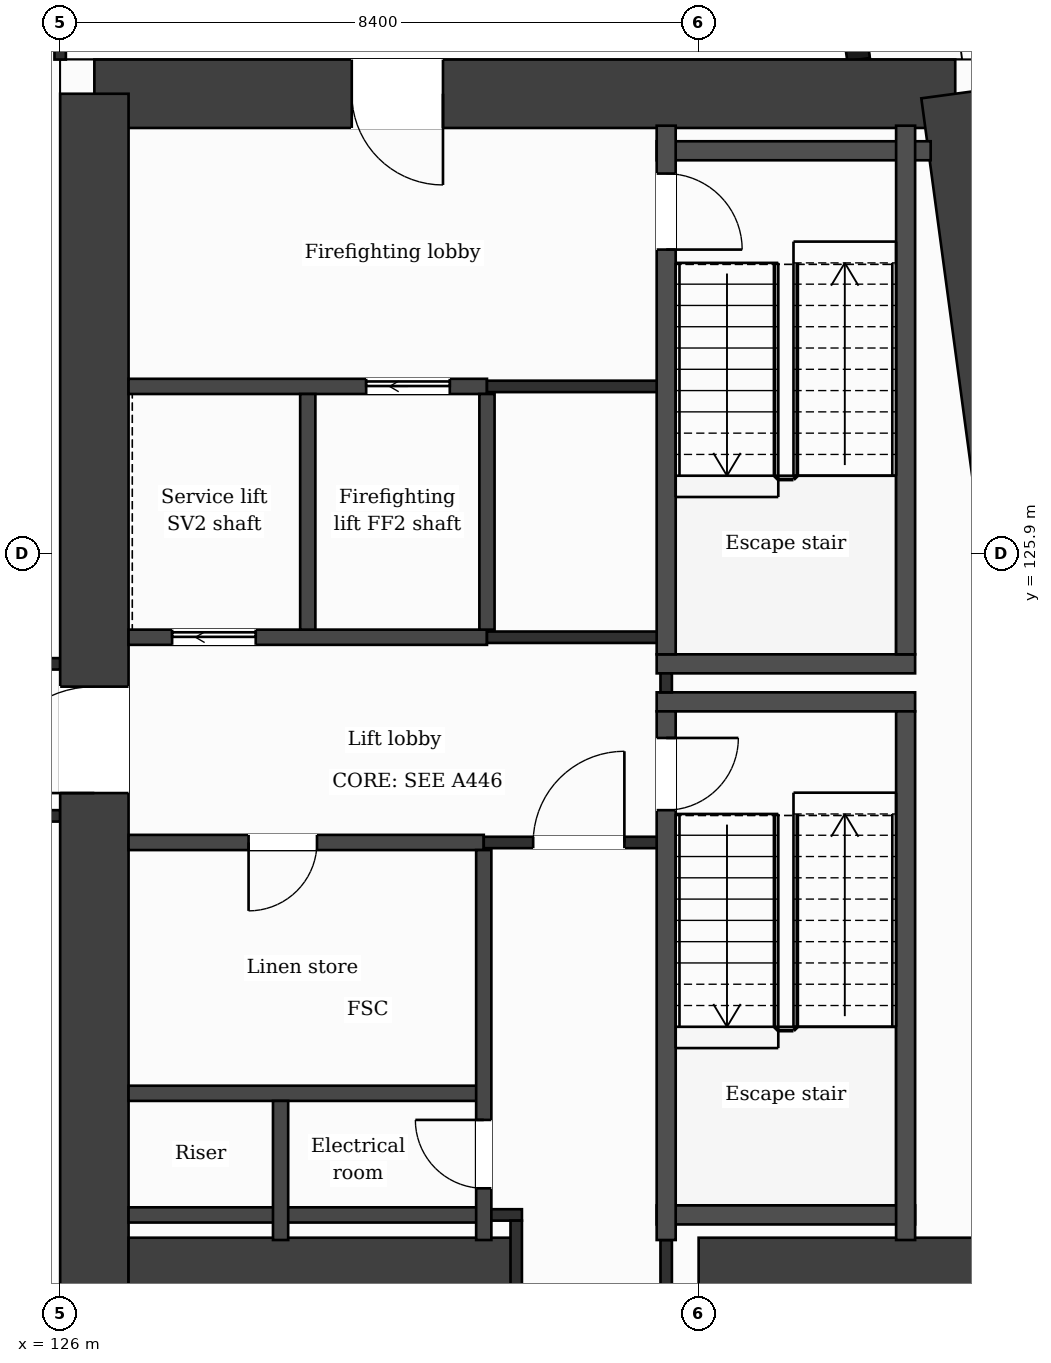
"""IFC4 building model, lengths in metres.
Left out: names, types, materials, properties, quantities, classifications, styles, units other than length and angle.
Written with IfcOpenShell. Run it as: python <this file> out.ifc"""

import sys

from ifc_helpers import new_model, si_unit, direction, frame, frame_2d, origin, place, context, subcontext, project, spatial, rectangle, extrude, element, fill, save


model = new_model("IFC4")
c1 = context("Model", 3, precision=1e-05, world=origin(), true_north=direction((0.0, 1.0)))
c2 = subcontext(c1, "Body", "Model", "MODEL_VIEW")
j1 = project(units=[si_unit("LENGTHUNIT", "METRE"), si_unit("PLANEANGLEUNIT", "RADIAN")], contexts=[c1])
p1 = place(None, origin())
s1 = spatial("IfcSite", under=j1, at=p1, CompositionType="ELEMENT")
p2 = place(p1, origin())
s2 = spatial("IfcBuilding", under=s1, at=p2, CompositionType="ELEMENT")
p3 = place(p2, frame((0.0, 0.0, 188.5)))
s3 = spatial("IfcBuildingStorey", under=s2, at=p3, CompositionType="ELEMENT", Elevation=188.5)
p4 = place(p3, frame((126.45, 131.95, 0.0), z_axis=(0.0, 0.0, 1.0), x_axis=(1.0, 0.0, 0.0)))
e1 = element("IfcWall", 1, at=p4, inside=s3, PredefinedType="SHEAR", context=c2, shape_type="SweptSolid", body=[
    extrude(rectangle(XDim=11.326, YDim=0.9, at=frame_2d((5.663, 0.0))), origin(), (0.0, 0.0, 1.0), 3.7),
])
p5 = place(p4, frame((3.386, 0.0, 0.0)))
e2 = element("IfcOpeningElement", 2, at=p5, cuts=e1, PredefinedType="OPENING", context=c2, shape_type="SweptSolid", body=[
    extrude(rectangle(XDim=1.2, YDim=2.1, at=frame_2d((0.6, 1.05))), frame((0.0, 0.46, 0.0), z_axis=(0.0, -1.0, 0.0), x_axis=(1.0, 0.0, 0.0)), (0.0, 0.0, 1.0), 0.92),
])
p6 = place(p3, frame((137.776, 131.95, 0.0), z_axis=(0.0, 0.0, 1.0), x_axis=(0.133421759112, -0.991059349482, 0.0)))
e3 = element("IfcWall", 3, at=p6, inside=s3, PredefinedType="SHEAR", context=c2, shape_type="SweptSolid", body=[
    extrude(rectangle(XDim=21.29, YDim=0.9, at=frame_2d((10.645, 0.0))), origin(), (0.0, 0.0, 1.0), 3.7),
])
p7 = place(p3, frame((126.45, 110.85, 0.0), z_axis=(0.0, 0.0, 1.0), x_axis=(0.0, 1.0, 0.0)))
e4 = element("IfcWall", 4, at=p7, inside=s3, PredefinedType="SHEAR", context=c2, shape_type="SweptSolid", body=[
    extrude(rectangle(XDim=21.1, YDim=0.9, at=frame_2d((10.55, 0.0))), origin(), (0.0, 0.0, 1.0), 3.7),
])
p8 = place(p7, frame((11.9, 0.0, 0.0)))
e5 = element("IfcOpeningElement", 5, at=p8, cuts=e4, PredefinedType="OPENING", context=c2, shape_type="SweptSolid", body=[
    extrude(rectangle(XDim=1.4, YDim=2.1, at=frame_2d((0.7, 1.05))), frame((0.0, 0.46, 0.0), z_axis=(0.0, -1.0, 0.0), x_axis=(1.0, 0.0, 0.0)), (0.0, 0.0, 1.0), 0.92),
])
p9 = place(p3, frame((126.9, 116.45, 0.0), z_axis=(0.0, 0.0, 1.0), x_axis=(1.0, 0.0, 0.0)))
e6 = element("IfcWall", 6, at=p9, inside=s3, PredefinedType="SHEAR", context=c2, shape_type="SweptSolid", body=[
    extrude(rectangle(XDim=5.1, YDim=0.9, at=frame_2d((2.55, 0.0))), origin(), (0.0, 0.0, 1.0), 3.7),
])
p10 = place(p3, frame((134.4, 116.45, 0.0), z_axis=(0.0, 0.0, 1.0), x_axis=(1.0, 0.0, 0.0)))
e7 = element("IfcWall", 7, at=p10, inside=s3, PredefinedType="SHEAR", context=c2, shape_type="SweptSolid", body=[
    extrude(rectangle(XDim=5.077, YDim=0.9, at=frame_2d((2.539, 0.0))), origin(), (0.0, 0.0, 1.0), 3.7),
])
p11 = place(p3, frame((136.504, 132.4, 0.0), z_axis=(0.0, 0.0, 1.0), x_axis=(-0.133399697462, 0.99106231929, 0.0)))
e8 = element("IfcWall", 8, at=p11, inside=s3, PredefinedType="SOLIDWALL", context=c2, shape_type="SweptSolid", body=[
    extrude(rectangle(XDim=6.74, YDim=0.3, at=frame_2d((3.37, 0.0))), origin(), (0.0, 0.0, 1.0), 3.25),
])
p12 = place(p11, frame((1.115, 0.0, 0.0)))
e9 = element("IfcOpeningElement", 9, at=p12, cuts=e8, PredefinedType="OPENING", context=c2, shape_type="SweptSolid", body=[
    extrude(rectangle(XDim=1.2, YDim=2.4, at=frame_2d((0.6, 1.2))), frame((0.0, 0.16, 0.0), z_axis=(0.0, -1.0, 0.0), x_axis=(1.0, 0.0, 0.0)), (0.0, 0.0, 1.0), 0.32),
])
p13 = place(p11, frame((4.436, 0.0, 0.9)))
e10 = element("IfcOpeningElement", 10, at=p13, cuts=e8, PredefinedType="OPENING", context=c2, shape_type="SweptSolid", body=[
    extrude(rectangle(XDim=1.2, YDim=2.1, at=frame_2d((0.6, 1.05))), frame((0.0, 0.16, 0.0), z_axis=(0.0, -1.0, 0.0), x_axis=(1.0, 0.0, 0.0)), (0.0, 0.0, 1.0), 0.32),
])
p14 = place(p3, frame((126.9, 117.2, 0.0), z_axis=(0.0, 0.0, 1.0), x_axis=(1.0, 0.0, 0.0)))
e11 = element("IfcWall", 11, at=p14, inside=s3, PredefinedType="PARTITIONING", context=c2, shape_type="SweptSolid", body=[
    extrude(rectangle(XDim=4.673, YDim=0.2, at=frame_2d((2.336, 0.0))), origin(), (0.0, 0.0, 1.0), 3.25),
])
p15 = place(p3, frame((131.573, 117.2, 0.0), z_axis=(0.0, 0.0, 1.0), x_axis=(1.0, 0.0, 0.0)))
e12 = element("IfcWall", 12, at=p15, inside=s3, PredefinedType="PARTITIONING", context=c2, shape_type="SweptSolid", body=[
    extrude(rectangle(XDim=0.502, YDim=0.15, at=frame_2d((0.251, 0.0))), origin(), (0.0, 0.0, 1.0), 3.25),
])
p16 = place(p3, frame((133.848, 117.2, 0.0), z_axis=(0.0, 0.0, 1.0), x_axis=(1.0, 0.0, 0.0)))
e13 = element("IfcWall", 13, at=p16, inside=s3, PredefinedType="PARTITIONING", context=c2, shape_type="SweptSolid", body=[
    extrude(rectangle(XDim=3.4, YDim=0.25, at=frame_2d((1.7, 0.0))), origin(), (0.0, 0.0, 1.0), 3.25),
])
p17 = place(p3, frame((126.9, 118.8, 0.0), z_axis=(0.0, 0.0, 1.0), x_axis=(1.0, 0.0, 0.0)))
e14 = element("IfcWall", 14, at=p17, inside=s3, PredefinedType="PARTITIONING", context=c2, shape_type="SweptSolid", body=[
    extrude(rectangle(XDim=4.673, YDim=0.2, at=frame_2d((2.336, 0.0))), origin(), (0.0, 0.0, 1.0), 3.25),
])
p18 = place(p3, frame((126.9, 122.1, 0.0), z_axis=(0.0, 0.0, 1.0), x_axis=(1.0, 0.0, 0.0)))
e15 = element("IfcWall", 15, at=p18, inside=s3, PredefinedType="PARTITIONING", context=c2, shape_type="SweptSolid", body=[
    extrude(rectangle(XDim=4.673, YDim=0.2, at=frame_2d((2.336, 0.0))), origin(), (0.0, 0.0, 1.0), 3.25),
])
p19 = place(p18, frame((1.579, 0.0, 0.0)))
e16 = element("IfcOpeningElement", 16, at=p19, cuts=e15, PredefinedType="OPENING", context=c2, shape_type="SweptSolid", body=[
    extrude(rectangle(XDim=0.9, YDim=2.1, at=frame_2d((0.45, 1.05))), frame((0.0, 0.11, 0.0), z_axis=(0.0, -1.0, 0.0), x_axis=(1.0, 0.0, 0.0)), (0.0, 0.0, 1.0), 0.22),
])
p20 = place(p3, frame((131.573, 122.1, 0.0), z_axis=(0.0, 0.0, 1.0), x_axis=(1.0, 0.0, 0.0)))
e17 = element("IfcWall", 17, at=p20, inside=s3, PredefinedType="PARTITIONING", context=c2, shape_type="SweptSolid", body=[
    extrude(rectangle(XDim=2.4, YDim=0.15, at=frame_2d((1.2, 0.0))), origin(), (0.0, 0.0, 1.0), 3.25),
])
p21 = place(p20, frame((0.65, 0.0, 0.0)))
e18 = element("IfcOpeningElement", 18, at=p21, cuts=e17, PredefinedType="OPENING", context=c2, shape_type="SweptSolid", body=[
    extrude(rectangle(XDim=1.2, YDim=2.1, at=frame_2d((0.6, 1.05))), frame((0.0, 0.085, 0.0), z_axis=(0.0, -1.0, 0.0), x_axis=(1.0, 0.0, 0.0)), (0.0, 0.0, 1.0), 0.17),
])
p22 = place(p3, frame((100.8, 122.45, 0.0), z_axis=(0.0, 0.0, 1.0), x_axis=(1.0, 0.0, 0.0)))
e19 = element("IfcWall", 19, at=p22, inside=s3, PredefinedType="PARTITIONING", context=c2, shape_type="SweptSolid", body=[
    extrude(rectangle(XDim=25.2, YDim=0.15, at=frame_2d((12.6, 0.0))), origin(), (0.0, 0.0, 1.0), 3.25),
])
for number, where, z_axis, x_axis in (
    (20, (133.848, 123.95, 0.0), (0.0, 0.0, 1.0), (1.0, 0.0, 0.0)),
    (21, (133.848, 124.45, 0.0), (0.0, 0.0, 1.0), (1.0, 0.0, 0.0)),
):
    element("IfcWall", number, at=place(p3, frame(where, z_axis=z_axis, x_axis=x_axis)), inside=s3, PredefinedType="PARTITIONING", context=c2, shape_type="SweptSolid", body=[
        extrude(rectangle(XDim=3.4, YDim=0.25, at=frame_2d((1.7, 0.0))), origin(), (0.0, 0.0, 1.0), 3.25),
    ])
p23 = place(p3, frame((100.8, 124.45, 0.0), z_axis=(0.0, 0.0, 1.0), x_axis=(1.0, 0.0, 0.0)))
e22 = element("IfcWall", 22, at=p23, inside=s3, PredefinedType="PARTITIONING", context=c2, shape_type="SweptSolid", body=[
    extrude(rectangle(XDim=25.2, YDim=0.15, at=frame_2d((12.6, 0.0))), origin(), (0.0, 0.0, 1.0), 3.25),
])
p24 = place(p23, frame((0.675, 0.0, 0.0)))
e23 = element("IfcOpeningElement", 23, at=p24, cuts=e22, PredefinedType="OPENING", context=c2, shape_type="SweptSolid", body=[
    extrude(rectangle(XDim=1.0, YDim=2.1, at=frame_2d((0.5, 1.05))), frame((0.0, 0.085, 0.0), z_axis=(0.0, -1.0, 0.0), x_axis=(1.0, 0.0, 0.0)), (0.0, 0.0, 1.0), 0.17),
])
p25 = place(p23, frame((5.175, 0.0, 0.0)))
e24 = element("IfcOpeningElement", 24, at=p25, cuts=e22, PredefinedType="OPENING", context=c2, shape_type="SweptSolid", body=[
    extrude(rectangle(XDim=1.0, YDim=2.1, at=frame_2d((0.5, 1.05))), frame((0.0, 0.085, 0.0), z_axis=(0.0, -1.0, 0.0), x_axis=(1.0, 0.0, 0.0)), (0.0, 0.0, 1.0), 0.17),
])
p26 = place(p23, frame((10.425, 0.0, 0.0)))
e25 = element("IfcOpeningElement", 25, at=p26, cuts=e22, PredefinedType="OPENING", context=c2, shape_type="SweptSolid", body=[
    extrude(rectangle(XDim=1.0, YDim=2.1, at=frame_2d((0.5, 1.05))), frame((0.0, 0.085, 0.0), z_axis=(0.0, -1.0, 0.0), x_axis=(1.0, 0.0, 0.0)), (0.0, 0.0, 1.0), 0.17),
])
p27 = place(p23, frame((22.175, 0.0, 0.0)))
e26 = element("IfcOpeningElement", 26, at=p27, cuts=e22, PredefinedType="OPENING", context=c2, shape_type="SweptSolid", body=[
    extrude(rectangle(XDim=1.0, YDim=2.1, at=frame_2d((0.5, 1.05))), frame((0.0, 0.085, 0.0), z_axis=(0.0, -1.0, 0.0), x_axis=(1.0, 0.0, 0.0)), (0.0, 0.0, 1.0), 0.17),
])
p28 = place(p3, frame((126.9, 124.8, 0.0), z_axis=(0.0, 0.0, 1.0), x_axis=(1.0, 0.0, 0.0)))
e27 = element("IfcWall", 27, at=p28, inside=s3, PredefinedType="PARTITIONING", context=c2, shape_type="SweptSolid", body=[
    extrude(rectangle(XDim=4.715, YDim=0.2, at=frame_2d((2.358, 0.0))), origin(), (0.0, 0.0, 1.0), 3.25),
])
p29 = place(p28, frame((0.573, 0.0, 0.0)))
e28 = element("IfcOpeningElement", 28, at=p29, cuts=e27, PredefinedType="OPENING", context=c2, shape_type="SweptSolid", body=[
    extrude(rectangle(XDim=1.1, YDim=2.1, at=frame_2d((0.55, 1.05))), frame((0.0, 0.11, 0.0), z_axis=(0.0, -1.0, 0.0), x_axis=(1.0, 0.0, 0.0)), (0.0, 0.0, 1.0), 0.22),
])
p30 = place(p3, frame((131.615, 124.8, 0.0), z_axis=(0.0, 0.0, 1.0), x_axis=(1.0, 0.0, 0.0)))
e29 = element("IfcWall", 29, at=p30, inside=s3, PredefinedType="PARTITIONING", context=c2, shape_type="SweptSolid", body=[
    extrude(rectangle(XDim=2.483, YDim=0.15, at=frame_2d((1.241, 0.0))), origin(), (0.0, 0.0, 1.0), 3.25),
])
p31 = place(p3, frame((126.9, 128.1, 0.0), z_axis=(0.0, 0.0, 1.0), x_axis=(1.0, 0.0, 0.0)))
e30 = element("IfcWall", 30, at=p31, inside=s3, PredefinedType="PARTITIONING", context=c2, shape_type="SweptSolid", body=[
    extrude(rectangle(XDim=4.715, YDim=0.2, at=frame_2d((2.358, 0.0))), origin(), (0.0, 0.0, 1.0), 3.25),
])
p32 = place(p31, frame((3.126, 0.0, 0.0)))
e31 = element("IfcOpeningElement", 31, at=p32, cuts=e30, PredefinedType="OPENING", context=c2, shape_type="SweptSolid", body=[
    extrude(rectangle(XDim=1.1, YDim=2.1, at=frame_2d((0.55, 1.05))), frame((0.0, 0.11, 0.0), z_axis=(0.0, -1.0, 0.0), x_axis=(1.0, 0.0, 0.0)), (0.0, 0.0, 1.0), 0.22),
])
p33 = place(p3, frame((131.615, 128.1, 0.0), z_axis=(0.0, 0.0, 1.0), x_axis=(1.0, 0.0, 0.0)))
e32 = element("IfcWall", 32, at=p33, inside=s3, PredefinedType="PARTITIONING", context=c2, shape_type="SweptSolid", body=[
    extrude(rectangle(XDim=2.358, YDim=0.15, at=frame_2d((1.179, 0.0))), origin(), (0.0, 0.0, 1.0), 3.25),
])
p34 = place(p3, frame((133.848, 131.2, 0.0), z_axis=(0.0, 0.0, 1.0), x_axis=(1.0, 0.0, 0.0)))
e33 = element("IfcWall", 33, at=p34, inside=s3, PredefinedType="PARTITIONING", context=c2, shape_type="SweptSolid", body=[
    extrude(rectangle(XDim=3.605, YDim=0.25, at=frame_2d((1.802, 0.0))), origin(), (0.0, 0.0, 1.0), 3.25),
])
p35 = place(p3, frame((126.0, 132.4, 0.0), z_axis=(0.0, 0.0, 1.0), x_axis=(0.0, 1.0, 0.0)))
e34 = element("IfcWall", 34, at=p35, inside=s3, PredefinedType="PARTITIONING", context=c2, shape_type="SweptSolid", body=[
    extrude(rectangle(XDim=1.325, YDim=0.15, at=frame_2d((0.663, 0.0))), origin(), (0.0, 0.0, 1.0), 3.25),
])
p36 = place(p3, frame((128.9, 116.87, 0.0), z_axis=(0.0, 0.0, 1.0), x_axis=(0.0, 1.0, 0.0)))
e35 = element("IfcWall", 35, at=p36, inside=s3, PredefinedType="PARTITIONING", context=c2, shape_type="SweptSolid", body=[
    extrude(rectangle(XDim=1.83, YDim=0.2, at=frame_2d((0.915, 0.0))), origin(), (0.0, 0.0, 1.0), 3.25),
])
p37 = place(p3, frame((129.258, 124.9, 0.0), z_axis=(0.0, 0.0, 1.0), x_axis=(0.0, 1.0, 0.0)))
e36 = element("IfcWall", 36, at=p37, inside=s3, PredefinedType="PARTITIONING", context=c2, shape_type="SweptSolid", body=[
    extrude(rectangle(XDim=3.1, YDim=0.2, at=frame_2d((1.55, 0.0))), origin(), (0.0, 0.0, 1.0), 3.25),
])
p38 = place(p3, frame((131.573, 116.87, 0.0), z_axis=(0.0, 0.0, 1.0), x_axis=(0.0, 1.0, 0.0)))
e37 = element("IfcWall", 37, at=p38, inside=s3, PredefinedType="PARTITIONING", context=c2, shape_type="SweptSolid", body=[
    extrude(rectangle(XDim=5.13, YDim=0.2, at=frame_2d((2.565, 0.0))), origin(), (0.0, 0.0, 1.0), 3.25),
])
p39 = place(p38, frame((0.68, 0.0, 0.0)))
e38 = element("IfcOpeningElement", 38, at=p39, cuts=e37, PredefinedType="OPENING", context=c2, shape_type="SweptSolid", body=[
    extrude(rectangle(XDim=0.9, YDim=2.1, at=frame_2d((0.45, 1.05))), frame((0.0, 0.11, 0.0), z_axis=(0.0, -1.0, 0.0), x_axis=(1.0, 0.0, 0.0)), (0.0, 0.0, 1.0), 0.22),
])
p40 = place(p3, frame((131.615, 124.9, 0.0), z_axis=(0.0, 0.0, 1.0), x_axis=(0.0, 1.0, 0.0)))
e39 = element("IfcWall", 39, at=p40, inside=s3, PredefinedType="PARTITIONING", context=c2, shape_type="SweptSolid", body=[
    extrude(rectangle(XDim=3.1, YDim=0.2, at=frame_2d((1.55, 0.0))), origin(), (0.0, 0.0, 1.0), 3.25),
])
p41 = place(p3, frame((132.0, 116.0, 0.0), z_axis=(0.0, 0.0, 1.0), x_axis=(0.0, 1.0, 0.0)))
e40 = element("IfcWall", 40, at=p41, inside=s3, PredefinedType="PARTITIONING", context=c2, shape_type="SweptSolid", body=[
    extrude(rectangle(XDim=1.125, YDim=0.15, at=frame_2d((0.562, 0.0))), origin(), (0.0, 0.0, 1.0), 3.25),
])
p42 = place(p3, frame((133.973, 116.0, 0.0), z_axis=(0.0, 0.0, 1.0), x_axis=(0.0, 1.0, 0.0)))
e41 = element("IfcWall", 41, at=p42, inside=s3, PredefinedType="PARTITIONING", context=c2, shape_type="SweptSolid", body=[
    extrude(rectangle(XDim=0.87, YDim=0.15, at=frame_2d((0.435, 0.0))), origin(), (0.0, 0.0, 1.0), 3.25),
])
p43 = place(p3, frame((133.973, 124.075, 0.0), z_axis=(0.0, 0.0, 1.0), x_axis=(0.0, 1.0, 0.0)))
e42 = element("IfcWall", 42, at=p43, inside=s3, PredefinedType="PARTITIONING", context=c2, shape_type="SweptSolid", body=[
    extrude(rectangle(XDim=0.25, YDim=0.15, at=frame_2d((0.125, 0.0))), origin(), (0.0, 0.0, 1.0), 3.25),
])
p44 = place(p3, frame((133.973, 116.87, 0.0), z_axis=(0.0, 0.0, 1.0), x_axis=(0.0, 1.0, 0.0)))
e43 = element("IfcWall", 43, at=p44, inside=s3, PredefinedType="PARTITIONING", context=c2, shape_type="SweptSolid", body=[
    extrude(rectangle(XDim=6.955, YDim=0.25, at=frame_2d((3.478, 0.0))), origin(), (0.0, 0.0, 1.0), 3.25),
])
p45 = place(p44, frame((5.655, 0.0, 0.0)))
e44 = element("IfcOpeningElement", 44, at=p45, cuts=e43, PredefinedType="OPENING", context=c2, shape_type="SweptSolid", body=[
    extrude(rectangle(XDim=0.95, YDim=2.1, at=frame_2d((0.475, 1.05))), frame((0.0, 0.135, 0.0), z_axis=(0.0, -1.0, 0.0), x_axis=(1.0, 0.0, 0.0)), (0.0, 0.0, 1.0), 0.27),
])
p46 = place(p3, frame((133.973, 124.575, 0.0), z_axis=(0.0, 0.0, 1.0), x_axis=(0.0, 1.0, 0.0)))
e45 = element("IfcWall", 45, at=p46, inside=s3, PredefinedType="PARTITIONING", context=c2, shape_type="SweptSolid", body=[
    extrude(rectangle(XDim=6.955, YDim=0.25, at=frame_2d((3.478, 0.0))), origin(), (0.0, 0.0, 1.0), 3.25),
])
p47 = place(p46, frame((5.325, 0.0, 0.0)))
e46 = element("IfcOpeningElement", 46, at=p47, cuts=e45, PredefinedType="OPENING", context=c2, shape_type="SweptSolid", body=[
    extrude(rectangle(XDim=1.0, YDim=2.1, at=frame_2d((0.5, 1.05))), frame((0.0, 0.135, 0.0), z_axis=(0.0, -1.0, 0.0), x_axis=(1.0, 0.0, 0.0)), (0.0, 0.0, 1.0), 0.27),
])
p48 = place(p3, frame((137.123, 116.87, 0.0), z_axis=(0.0, 0.0, 1.0), x_axis=(0.0, 1.0, 0.0)))
e47 = element("IfcWall", 47, at=p48, inside=s3, PredefinedType="PARTITIONING", context=c2, shape_type="SweptSolid", body=[
    extrude(rectangle(XDim=6.955, YDim=0.25, at=frame_2d((3.478, 0.0))), origin(), (0.0, 0.0, 1.0), 3.25),
])
p49 = place(p3, frame((137.123, 124.575, 0.0), z_axis=(0.0, 0.0, 1.0), x_axis=(0.0, 1.0, 0.0)))
e48 = element("IfcWall", 48, at=p49, inside=s3, PredefinedType="PARTITIONING", context=c2, shape_type="SweptSolid", body=[
    extrude(rectangle(XDim=6.955, YDim=0.25, at=frame_2d((3.478, 0.0))), origin(), (0.0, 0.0, 1.0), 3.25),
])
p50 = place(p21, origin())
e49 = element("IfcDoor", 49, at=p50, inside=s3, OperationType="SINGLE_SWING_RIGHT", PredefinedType="DOOR", context=c2, shape_type="SweptSolid", body=[
    extrude(rectangle(XDim=1.2, YDim=2.1, at=frame_2d((0.6, 1.05))), frame((0.0, 0.025, 0.0), z_axis=(0.0, -1.0, 0.0), x_axis=(1.0, 0.0, 0.0)), (0.0, 0.0, 1.0), 0.05),
])
fill(e18, e49)
p51 = place(p32, origin())
e50 = element("IfcDoor", 50, at=p51, inside=s3, OperationType="SLIDING_TO_LEFT", PredefinedType="DOOR", context=c2, shape_type="SweptSolid", body=[
    extrude(rectangle(XDim=1.1, YDim=2.1, at=frame_2d((0.55, 1.05))), frame((0.0, 0.025, 0.0), z_axis=(0.0, -1.0, 0.0), x_axis=(1.0, 0.0, 0.0)), (0.0, 0.0, 1.0), 0.05),
])
fill(e31, e50)
p52 = place(p29, origin())
e51 = element("IfcDoor", 51, at=p52, inside=s3, OperationType="SLIDING_TO_LEFT", PredefinedType="DOOR", context=c2, shape_type="SweptSolid", body=[
    extrude(rectangle(XDim=1.1, YDim=2.1, at=frame_2d((0.55, 1.05))), frame((0.0, 0.025, 0.0), z_axis=(0.0, -1.0, 0.0), x_axis=(1.0, 0.0, 0.0)), (0.0, 0.0, 1.0), 0.05),
])
fill(e28, e51)
p53 = place(p19, origin())
e52 = element("IfcDoor", 52, at=p53, inside=s3, OperationType="SINGLE_SWING_LEFT", PredefinedType="DOOR", context=c2, shape_type="SweptSolid", body=[
    extrude(rectangle(XDim=0.9, YDim=2.1, at=frame_2d((0.45, 1.05))), frame((0.0, 0.025, 0.0), z_axis=(0.0, -1.0, 0.0), x_axis=(1.0, 0.0, 0.0)), (0.0, 0.0, 1.0), 0.05),
])
fill(e16, e52)
p54 = place(p45, origin())
e53 = element("IfcDoor", 53, at=p54, inside=s3, OperationType="SINGLE_SWING_RIGHT", PredefinedType="DOOR", context=c2, shape_type="SweptSolid", body=[
    extrude(rectangle(XDim=0.95, YDim=2.1, at=frame_2d((0.475, 1.05))), frame((0.0, 0.025, 0.0), z_axis=(0.0, -1.0, 0.0), x_axis=(1.0, 0.0, 0.0)), (0.0, 0.0, 1.0), 0.05),
])
fill(e44, e53)
p55 = place(p47, origin())
e54 = element("IfcDoor", 54, at=p55, inside=s3, OperationType="SINGLE_SWING_LEFT", PredefinedType="DOOR", context=c2, shape_type="SweptSolid", body=[
    extrude(rectangle(XDim=1.0, YDim=2.1, at=frame_2d((0.5, 1.05))), frame((0.0, 0.025, 0.0), z_axis=(0.0, -1.0, 0.0), x_axis=(1.0, 0.0, 0.0)), (0.0, 0.0, 1.0), 0.05),
])
fill(e46, e54)
p56 = place(p39, origin())
e55 = element("IfcDoor", 55, at=p56, inside=s3, OperationType="SINGLE_SWING_RIGHT", PredefinedType="DOOR", context=c2, shape_type="SweptSolid", body=[
    extrude(rectangle(XDim=0.9, YDim=2.1, at=frame_2d((0.45, 1.05))), frame((0.0, 0.025, 0.0), z_axis=(0.0, -1.0, 0.0), x_axis=(1.0, 0.0, 0.0)), (0.0, 0.0, 1.0), 0.05),
])
fill(e38, e55)
p57 = place(p5, origin())
e56 = element("IfcDoor", 56, at=p57, inside=s3, OperationType="SINGLE_SWING_RIGHT", PredefinedType="DOOR", context=c2, shape_type="SweptSolid", body=[
    extrude(rectangle(XDim=1.2, YDim=2.1, at=frame_2d((0.6, 1.05))), frame((0.0, 0.025, 0.0), z_axis=(0.0, -1.0, 0.0), x_axis=(1.0, 0.0, 0.0)), (0.0, 0.0, 1.0), 0.05),
])
fill(e2, e56)
p58 = place(p8, origin())
e57 = element("IfcDoor", 57, at=p58, inside=s3, OperationType="SINGLE_SWING_LEFT", PredefinedType="DOOR", context=c2, shape_type="SweptSolid", body=[
    extrude(rectangle(XDim=1.4, YDim=2.1, at=frame_2d((0.7, 1.05))), frame((0.0, 0.025, 0.0), z_axis=(0.0, -1.0, 0.0), x_axis=(1.0, 0.0, 0.0)), (0.0, 0.0, 1.0), 0.05),
])
fill(e5, e57)
save(model, sys.argv[1])
